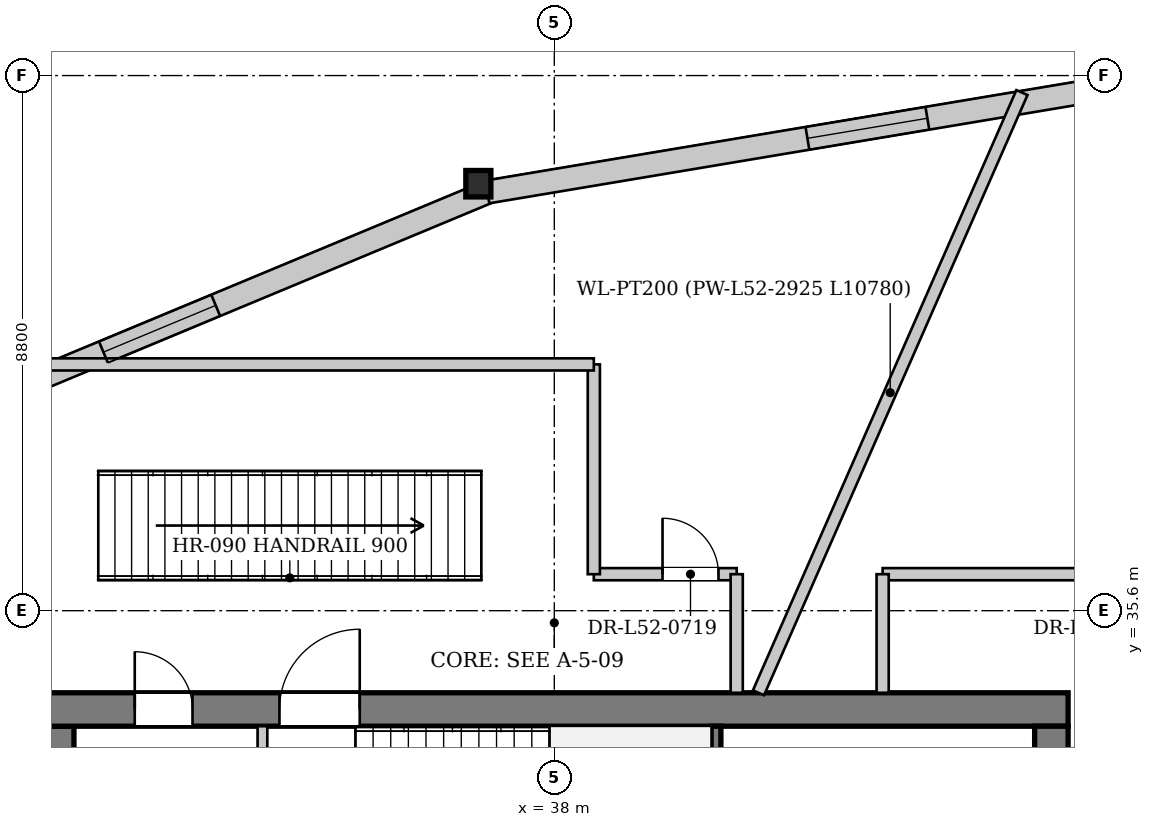
"""IFC4 building model, lengths in metres.
Left out: names, types, materials, properties, quantities, classifications, styles, units other than length and angle.
Written with IfcOpenShell. Run it as: python <this file> out.ifc"""

import sys

from ifc_helpers import new_model, si_unit, direction, frame, frame_2d, origin, origin_2d, place, context, subcontext, project, spatial, rectangle, i_section, extrude, source, transform, mapped, element, fill, save


model = new_model("IFC4")
c1 = context("Model", 3, precision=1e-05, world=origin(), true_north=direction((0.0, 1.0)))
c2 = subcontext(c1, "Body", "Model", "MODEL_VIEW")
j1 = project(units=[si_unit("LENGTHUNIT", "METRE"), si_unit("PLANEANGLEUNIT", "RADIAN")], contexts=[c1])
p1 = place(None, origin())
s1 = spatial("IfcSite", under=j1, at=p1, CompositionType="ELEMENT")
p2 = place(p1, origin())
s2 = spatial("IfcBuilding", under=s1, at=p2, CompositionType="ELEMENT")
p3 = place(p2, frame((0.0, 0.0, 196.3)))
s3 = spatial("IfcBuildingStorey", under=s2, at=p3, CompositionType="ELEMENT", Elevation=196.3)
m1 = source(origin(), c2, "Body", "SweptSolid", [
    extrude(i_section(OverallWidth=0.412, OverallDepth=0.435, WebThickness=0.031, FlangeThickness=0.05, at=origin_2d()), origin(), (0.0, 0.0, 1.0), 3.844),
])
p4 = place(p3, frame((36.869, 42.674, 0.0), z_axis=(-0.061358573177, -0.027249304237, 0.997743755138), x_axis=(0.405875102932, -0.913928553455, 0.0)))
e1 = element("IfcColumn", 1, at=p4, inside=s3, PredefinedType="COLUMN", context=c2, shape_type="MappedRepresentation", body=[
    mapped(m1, transform((0.0, 0.0, 0.0), x_axis=(1.0, 0.0, 0.0), y_axis=(0.0, 1.0, 0.0), z_axis=(0.0, 0.0, 1.0), scale=1.0)),
])
p5 = place(p3, frame((16.053, 33.802, 0.0), z_axis=(0.0, 0.0, 1.0), x_axis=(0.923180319116, 0.384367140111, 0.0)))
e2 = element("IfcWall", 2, at=p5, inside=s3, PredefinedType="SOLIDWALL", context=c2, shape_type="SweptSolid", body=[
    extrude(rectangle(XDim=22.627, YDim=0.38, at=frame_2d((11.313, 0.0))), origin(), (0.0, 0.0, 1.0), 3.172),
])
p6 = place(p5, frame((5.336, 0.0, 0.252)))
e3 = element("IfcOpeningElement", 3, at=p6, cuts=e2, PredefinedType="OPENING", context=c2, shape_type="SweptSolid", body=[
    extrude(rectangle(XDim=2.0, YDim=2.8, at=frame_2d((1.0, 1.4))), frame((0.0, 0.2, 0.0), z_axis=(0.0, -1.0, 0.0), x_axis=(1.0, 0.0, 0.0)), (0.0, 0.0, 1.0), 0.4),
])
p7 = place(p5, frame((15.741, 0.0, 0.252)))
e4 = element("IfcOpeningElement", 4, at=p7, cuts=e2, PredefinedType="OPENING", context=c2, shape_type="SweptSolid", body=[
    extrude(rectangle(XDim=2.0, YDim=2.8, at=frame_2d((1.0, 1.4))), frame((0.0, 0.2, 0.0), z_axis=(0.0, -1.0, 0.0), x_axis=(1.0, 0.0, 0.0)), (0.0, 0.0, 1.0), 0.4),
])
p8 = place(p3, frame((36.9, 42.487, 0.0), z_axis=(0.0, 0.0, 1.0), x_axis=(0.986277614339, 0.165095328385, 0.0)))
e5 = element("IfcWall", 5, at=p8, inside=s3, PredefinedType="SOLIDWALL", context=c2, shape_type="SweptSolid", body=[
    extrude(rectangle(XDim=22.627, YDim=0.38, at=frame_2d((11.313, 0.0))), origin(), (0.0, 0.0, 1.0), 3.172),
])
p9 = place(p8, frame((5.336, 0.0, 0.252)))
e6 = element("IfcOpeningElement", 6, at=p9, cuts=e5, PredefinedType="OPENING", context=c2, shape_type="SweptSolid", body=[
    extrude(rectangle(XDim=2.0, YDim=2.8, at=frame_2d((1.0, 1.4))), frame((0.0, 0.2, 0.0), z_axis=(0.0, -1.0, 0.0), x_axis=(1.0, 0.0, 0.0)), (0.0, 0.0, 1.0), 0.4),
])
p10 = place(p8, frame((15.291, 0.0, 0.252)))
e7 = element("IfcOpeningElement", 7, at=p10, cuts=e5, PredefinedType="OPENING", context=c2, shape_type="SweptSolid", body=[
    extrude(rectangle(XDim=2.0, YDim=2.8, at=frame_2d((1.0, 1.4))), frame((0.0, 0.2, 0.0), z_axis=(0.0, -1.0, 0.0), x_axis=(1.0, 0.0, 0.0)), (0.0, 0.0, 1.0), 0.4),
])
p11 = place(p3, frame((29.825, 19.5, 0.0), z_axis=(0.0, 0.0, 1.0), x_axis=(0.0, 1.0, 0.0)))
e8 = element("IfcWall", 8, at=p11, inside=s3, PredefinedType="SHEAR", context=c2, shape_type="SweptSolid", body=[
    extrude(rectangle(XDim=14.2, YDim=0.55, at=frame_2d((7.1, 0.0))), origin(), (0.0, 0.0, 1.0), 3.78),
])
p12 = place(p11, frame((7.42, 0.0, 0.0)))
e9 = element("IfcOpeningElement", 9, at=p12, cuts=e8, PredefinedType="OPENING", context=c2, shape_type="SweptSolid", body=[
    extrude(rectangle(XDim=1.6, YDim=2.2, at=frame_2d((0.8, 1.1))), frame((0.0, 0.285, 0.0), z_axis=(0.0, -1.0, 0.0), x_axis=(1.0, 0.0, 0.0)), (0.0, 0.0, 1.0), 0.57),
])
p13 = place(p3, frame((29.55, 33.975, 0.0), z_axis=(0.0, 0.0, 1.0), x_axis=(1.0, 0.0, 0.0)))
e10 = element("IfcWall", 10, at=p13, inside=s3, PredefinedType="SHEAR", context=c2, shape_type="SweptSolid", body=[
    extrude(rectangle(XDim=16.9, YDim=0.55, at=frame_2d((8.45, 0.0))), origin(), (0.0, 0.0, 1.0), 3.78),
])
p14 = place(p13, frame((1.55, 0.0, 0.0)))
e11 = element("IfcOpeningElement", 11, at=p14, cuts=e10, PredefinedType="OPENING", context=c2, shape_type="SweptSolid", body=[
    extrude(rectangle(XDim=0.95, YDim=2.1, at=frame_2d((0.475, 1.05))), frame((0.0, 0.285, 0.0), z_axis=(0.0, -1.0, 0.0), x_axis=(1.0, 0.0, 0.0)), (0.0, 0.0, 1.0), 0.57),
])
p15 = place(p13, frame((3.93, 0.0, 0.0)))
e12 = element("IfcOpeningElement", 12, at=p15, cuts=e10, PredefinedType="OPENING", context=c2, shape_type="SweptSolid", body=[
    extrude(rectangle(XDim=1.32, YDim=2.2, at=frame_2d((0.66, 1.1))), frame((0.0, 0.285, 0.0), z_axis=(0.0, -1.0, 0.0), x_axis=(1.0, 0.0, 0.0)), (0.0, 0.0, 1.0), 0.57),
])
p16 = place(p3, frame((46.175, 33.7, 0.0), z_axis=(0.0, 0.0, 1.0), x_axis=(0.0, -1.0, 0.0)))
e13 = element("IfcWall", 13, at=p16, inside=s3, PredefinedType="SHEAR", context=c2, shape_type="SweptSolid", body=[
    extrude(rectangle(XDim=14.2, YDim=0.55, at=frame_2d((7.1, 0.0))), origin(), (0.0, 0.0, 1.0), 3.78),
])
p17 = place(p16, frame((5.18, 0.0, 0.0)))
e14 = element("IfcOpeningElement", 14, at=p17, cuts=e13, PredefinedType="OPENING", context=c2, shape_type="SweptSolid", body=[
    extrude(rectangle(XDim=1.6, YDim=2.2, at=frame_2d((0.8, 1.1))), frame((0.0, 0.285, 0.0), z_axis=(0.0, -1.0, 0.0), x_axis=(1.0, 0.0, 0.0)), (0.0, 0.0, 1.0), 0.57),
])
p18 = place(p16, frame((2.05, 0.0, 0.0)))
e15 = element("IfcOpeningElement", 15, at=p18, cuts=e13, PredefinedType="OPENING", context=c2, shape_type="SweptSolid", body=[
    extrude(rectangle(XDim=0.95, YDim=2.1, at=frame_2d((0.475, 1.05))), frame((0.0, 0.285, 0.0), z_axis=(0.0, -1.0, 0.0), x_axis=(1.0, 0.0, 0.0)), (0.0, 0.0, 1.0), 0.57),
])
p19 = place(p3, frame((40.66, 30.6, 0.0), z_axis=(0.0, 0.0, 1.0), x_axis=(0.0, 1.0, 0.0)))
e16 = element("IfcWall", 16, at=p19, inside=s3, PredefinedType="PARTITIONING", context=c2, shape_type="SweptSolid", body=[
    extrude(rectangle(XDim=3.1, YDim=0.16, at=frame_2d((1.55, 0.0))), origin(), (0.0, 0.0, 1.0), 3.78),
])
p20 = place(p3, frame((33.2, 28.44, 0.0), z_axis=(0.0, 0.0, 1.0), x_axis=(0.0, 1.0, 0.0)))
e17 = element("IfcWall", 17, at=p20, inside=s3, PredefinedType="PARTITIONING", context=c2, shape_type="SweptSolid", body=[
    extrude(rectangle(XDim=5.26, YDim=0.16, at=frame_2d((2.63, 0.0))), origin(), (0.0, 0.0, 1.0), 3.78),
])
p21 = place(p3, frame((41.358, 34.25, 0.0), z_axis=(0.0, 0.0, 1.0), x_axis=(0.401937727642, 0.915667004483, 0.0)))
e18 = element("IfcWall", 18, at=p21, inside=s3, PredefinedType="PARTITIONING", context=c2, shape_type="SweptSolid", body=[
    extrude(rectangle(XDim=10.78, YDim=0.2, at=frame_2d((5.39, 0.0))), origin(), (0.0, 0.0, 1.0), 3.78),
])
p22 = place(p3, frame((38.65, 36.2, 0.0), z_axis=(0.0, 0.0, 1.0), x_axis=(1.0, 0.0, 0.0)))
e19 = element("IfcWall", 19, at=p22, inside=s3, PredefinedType="PARTITIONING", context=c2, shape_type="SweptSolid", body=[
    extrude(rectangle(XDim=2.35, YDim=0.2, at=frame_2d((1.175, 0.0))), origin(), (0.0, 0.0, 1.0), 3.78),
])
p23 = place(p22, frame((1.13, 0.0, 0.0)))
e20 = element("IfcOpeningElement", 20, at=p23, cuts=e19, PredefinedType="OPENING", context=c2, shape_type="SweptSolid", body=[
    extrude(rectangle(XDim=0.92, YDim=2.1, at=frame_2d((0.46, 1.05))), frame((0.0, 0.11, 0.0), z_axis=(0.0, -1.0, 0.0), x_axis=(1.0, 0.0, 0.0)), (0.0, 0.0, 1.0), 0.22),
])
p24 = place(p3, frame((41.0, 34.25, 0.0), z_axis=(0.0, 0.0, 1.0), x_axis=(0.0, 1.0, 0.0)))
e21 = element("IfcWall", 21, at=p24, inside=s3, PredefinedType="PARTITIONING", context=c2, shape_type="SweptSolid", body=[
    extrude(rectangle(XDim=1.95, YDim=0.2, at=frame_2d((0.975, 0.0))), origin(), (0.0, 0.0, 1.0), 3.78),
])
p25 = place(p3, frame((43.4, 36.2, 0.0), z_axis=(0.0, 0.0, 1.0), x_axis=(1.0, 0.0, 0.0)))
e22 = element("IfcWall", 22, at=p25, inside=s3, PredefinedType="PARTITIONING", context=c2, shape_type="SweptSolid", body=[
    extrude(rectangle(XDim=5.0, YDim=0.2, at=frame_2d((2.5, 0.0))), origin(), (0.0, 0.0, 1.0), 3.78),
])
p26 = place(p25, frame((3.65, 0.0, 0.0)))
e23 = element("IfcOpeningElement", 23, at=p26, cuts=e22, PredefinedType="OPENING", context=c2, shape_type="SweptSolid", body=[
    extrude(rectangle(XDim=1.05, YDim=2.2, at=frame_2d((0.525, 1.1))), frame((0.0, 0.11, 0.0), z_axis=(0.0, -1.0, 0.0), x_axis=(1.0, 0.0, 0.0)), (0.0, 0.0, 1.0), 0.22),
])
p27 = place(p3, frame((43.4, 34.25, 0.0), z_axis=(0.0, 0.0, 1.0), x_axis=(0.0, 1.0, 0.0)))
e24 = element("IfcWall", 24, at=p27, inside=s3, PredefinedType="PARTITIONING", context=c2, shape_type="SweptSolid", body=[
    extrude(rectangle(XDim=1.95, YDim=0.2, at=frame_2d((0.975, 0.0))), origin(), (0.0, 0.0, 1.0), 3.78),
])
p28 = place(p3, frame((38.65, 36.2, 0.0), z_axis=(0.0, 0.0, 1.0), x_axis=(0.0, 1.0, 0.0)))
e25 = element("IfcWall", 25, at=p28, inside=s3, PredefinedType="PARTITIONING", context=c2, shape_type="SweptSolid", body=[
    extrude(rectangle(XDim=3.45, YDim=0.2, at=frame_2d((1.725, 0.0))), origin(), (0.0, 0.0, 1.0), 3.78),
])
p29 = place(p3, frame((29.683, 39.65, 0.0), z_axis=(0.0, 0.0, 1.0), x_axis=(1.0, 0.0, 0.0)))
e26 = element("IfcWall", 26, at=p29, inside=s3, PredefinedType="PARTITIONING", context=c2, shape_type="SweptSolid", body=[
    extrude(rectangle(XDim=8.967, YDim=0.2, at=frame_2d((4.483, 0.0))), origin(), (0.0, 0.0, 1.0), 3.165),
])
m2 = source(origin(), c2, "Body", "SweptSolid", [
    extrude(rectangle(XDim=2.0, YDim=2.8, at=frame_2d((1.0, 1.4))), frame((0.0, 0.03, 0.0), z_axis=(0.0, -1.0, 0.0), x_axis=(1.0, 0.0, 0.0)), (0.0, 0.0, 1.0), 0.06),
])
p30 = place(p7, origin())
e27 = element("IfcWindow", 27, at=p30, inside=s3, PartitioningType="SINGLE_PANEL", PredefinedType="WINDOW", context=c2, shape_type="MappedRepresentation", body=[
    mapped(m2, transform((0.0, 0.0, 0.0), x_axis=(1.0, 0.0, 0.0), y_axis=(0.0, 1.0, 0.0), z_axis=(0.0, 0.0, 1.0), scale=1.0)),
])
fill(e4, e27)
p31 = place(p9, origin())
e28 = element("IfcWindow", 28, at=p31, inside=s3, PartitioningType="SINGLE_PANEL", PredefinedType="WINDOW", context=c2, shape_type="MappedRepresentation", body=[
    mapped(m2, transform((0.0, 0.0, 0.0), x_axis=(1.0, 0.0, 0.0), y_axis=(0.0, 1.0, 0.0), z_axis=(0.0, 0.0, 1.0), scale=1.0)),
])
fill(e6, e28)
m3 = source(origin(), c2, "Body", "SweptSolid", [
    extrude(rectangle(XDim=0.95, YDim=2.1, at=frame_2d((0.475, 1.05))), frame((0.0, 0.025, 0.0), z_axis=(0.0, -1.0, 0.0), x_axis=(1.0, 0.0, 0.0)), (0.0, 0.0, 1.0), 0.05),
])
p32 = place(p14, origin())
e29 = element("IfcDoor", 29, at=p32, inside=s3, OperationType="SINGLE_SWING_LEFT", PredefinedType="DOOR", context=c2, shape_type="MappedRepresentation", body=[
    mapped(m3, transform((0.0, 0.0, 0.0), x_axis=(1.0, 0.0, 0.0), y_axis=(0.0, 1.0, 0.0), z_axis=(0.0, 0.0, 1.0), scale=1.0)),
])
fill(e11, e29)
m4 = source(origin(), c2, "Body", "SweptSolid", [
    extrude(rectangle(XDim=1.32, YDim=2.2, at=frame_2d((0.66, 1.1))), frame((0.0, 0.025, 0.0), z_axis=(0.0, -1.0, 0.0), x_axis=(1.0, 0.0, 0.0)), (0.0, 0.0, 1.0), 0.05),
])
p33 = place(p15, origin())
e30 = element("IfcDoor", 30, at=p33, inside=s3, OperationType="SINGLE_SWING_RIGHT", PredefinedType="DOOR", context=c2, shape_type="MappedRepresentation", body=[
    mapped(m4, transform((0.0, 0.0, 0.0), x_axis=(1.0, 0.0, 0.0), y_axis=(0.0, 1.0, 0.0), z_axis=(0.0, 0.0, 1.0), scale=1.0)),
])
fill(e12, e30)
m5 = source(origin(), c2, "Body", "SweptSolid", [
    extrude(rectangle(XDim=0.92, YDim=2.1, at=frame_2d((0.46, 1.05))), frame((0.0, 0.025, 0.0), z_axis=(0.0, -1.0, 0.0), x_axis=(1.0, 0.0, 0.0)), (0.0, 0.0, 1.0), 0.05),
])
p34 = place(p23, origin())
e31 = element("IfcDoor", 31, at=p34, inside=s3, OperationType="SINGLE_SWING_LEFT", PredefinedType="DOOR", context=c2, shape_type="MappedRepresentation", body=[
    mapped(m5, transform((0.0, 0.0, 0.0), x_axis=(1.0, 0.0, 0.0), y_axis=(0.0, 1.0, 0.0), z_axis=(0.0, 0.0, 1.0), scale=1.0)),
])
fill(e20, e31)
save(model, sys.argv[1])
